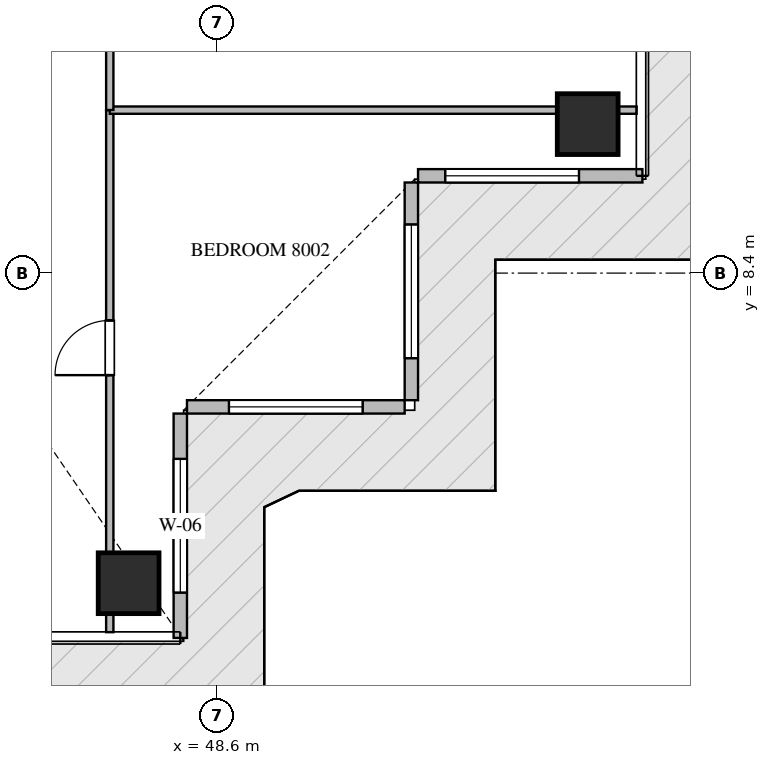
"""IFC4 building model, lengths in metres.
Left out: names, types, materials, properties, quantities, classifications, styles, units other than length and angle.
Written with IfcOpenShell. Run it as: python <this file> out.ifc"""

import sys

from ifc_helpers import new_model, si_unit, direction, frame, frame_2d, origin, origin_2d, place, context, subcontext, project, spatial, rectangle, extrude, source, transform, mapped, element, fill, save


model = new_model("IFC4")
c1 = context("Model", 3, precision=1e-05, world=origin(), true_north=direction((0.0, 1.0)))
c2 = subcontext(c1, "Body", "Model", "MODEL_VIEW")
j1 = project(units=[si_unit("LENGTHUNIT", "METRE"), si_unit("PLANEANGLEUNIT", "RADIAN")], contexts=[c1])
p1 = place(None, origin())
s1 = spatial("IfcSite", under=j1, at=p1, CompositionType="ELEMENT")
p2 = place(p1, origin())
s2 = spatial("IfcBuilding", under=s1, at=p2, CompositionType="ELEMENT")
p3 = place(p2, frame((0.0, 0.0, 321.8)))
s3 = spatial("IfcBuildingStorey", under=s2, at=p3, CompositionType="ELEMENT", Elevation=321.8)
m1 = source(origin(), c2, "Body", "SweptSolid", [
    extrude(rectangle(XDim=1.0, YDim=1.0, at=origin_2d()), origin(), (0.0, 0.0, 1.0), 4.05),
])
for number, where, z_axis, x_axis in (
    (1, (47.15, 3.3, -0.26), (0.0, 0.0, 1.0), (1.0, 0.0, 0.0)),
    (2, (54.7, 10.85, -0.26), (0.0, 0.0, 1.0), (1.0, 0.0, 0.0)),
):
    element("IfcColumn", number, at=place(p3, frame(where, z_axis=z_axis, x_axis=x_axis)), inside=s3, PredefinedType="COLUMN", context=c2, shape_type="MappedRepresentation", body=[
        mapped(m1, transform((0.0, 0.0, 0.0), scale=1.0)),
    ])
p4 = place(p3, frame((48.0, 2.4, 0.0), z_axis=(0.0, 0.0, 1.0), x_axis=(0.0, 1.0, 0.0)))
e3 = element("IfcWall", 3, at=p4, inside=s3, PredefinedType="ELEMENTEDWALL", context=c2, shape_type="SweptSolid", body=[
    extrude(rectangle(XDim=3.69, YDim=0.22, at=frame_2d((1.845, 0.0))), origin(), (0.0, 0.0, 1.0), 3.775),
])
p5 = place(p4, frame((0.745, 0.0, 0.65)))
e4 = element("IfcOpeningElement", 4, at=p5, cuts=e3, PredefinedType="OPENING", context=c2, shape_type="SweptSolid", body=[
    extrude(rectangle(XDim=2.2, YDim=2.4, at=frame_2d((1.1, 1.2))), frame((0.0, 0.12, 0.0), z_axis=(0.0, -1.0, 0.0), x_axis=(1.0, 0.0, 0.0)), (0.0, 0.0, 1.0), 0.24),
])
p6 = place(p3, frame((48.11, 6.2, 0.0), z_axis=(0.0, 0.0, 1.0), x_axis=(1.0, 0.0, 0.0)))
e5 = element("IfcWall", 5, at=p6, inside=s3, PredefinedType="ELEMENTEDWALL", context=c2, shape_type="SweptSolid", body=[
    extrude(rectangle(XDim=3.58, YDim=0.22, at=frame_2d((1.79, 0.0))), origin(), (0.0, 0.0, 1.0), 3.775),
])
p7 = place(p6, frame((0.69, 0.0, 0.65)))
e6 = element("IfcOpeningElement", 6, at=p7, cuts=e5, PredefinedType="OPENING", context=c2, shape_type="SweptSolid", body=[
    extrude(rectangle(XDim=2.2, YDim=2.4, at=frame_2d((1.1, 1.2))), frame((0.0, 0.12, 0.0), z_axis=(0.0, -1.0, 0.0), x_axis=(1.0, 0.0, 0.0)), (0.0, 0.0, 1.0), 0.24),
])
p8 = place(p3, frame((51.8, 6.31, 0.0), z_axis=(0.0, 0.0, 1.0), x_axis=(0.0, 1.0, 0.0)))
e7 = element("IfcWall", 7, at=p8, inside=s3, PredefinedType="ELEMENTEDWALL", context=c2, shape_type="SweptSolid", body=[
    extrude(rectangle(XDim=3.58, YDim=0.22, at=frame_2d((1.79, 0.0))), origin(), (0.0, 0.0, 1.0), 3.775),
])
p9 = place(p8, frame((0.69, 0.0, 0.65)))
e8 = element("IfcOpeningElement", 8, at=p9, cuts=e7, PredefinedType="OPENING", context=c2, shape_type="SweptSolid", body=[
    extrude(rectangle(XDim=2.2, YDim=2.4, at=frame_2d((1.1, 1.2))), frame((0.0, 0.12, 0.0), z_axis=(0.0, -1.0, 0.0), x_axis=(1.0, 0.0, 0.0)), (0.0, 0.0, 1.0), 0.24),
])
p10 = place(p3, frame((51.91, 10.0, 0.0), z_axis=(0.0, 0.0, 1.0), x_axis=(1.0, 0.0, 0.0)))
e9 = element("IfcWall", 9, at=p10, inside=s3, PredefinedType="ELEMENTEDWALL", context=c2, shape_type="SweptSolid", body=[
    extrude(rectangle(XDim=3.69, YDim=0.22, at=frame_2d((1.845, 0.0))), origin(), (0.0, 0.0, 1.0), 3.775),
])
p11 = place(p10, frame((0.447, 0.0, 0.65)))
e10 = element("IfcOpeningElement", 10, at=p11, cuts=e9, PredefinedType="OPENING", context=c2, shape_type="SweptSolid", body=[
    extrude(rectangle(XDim=2.2, YDim=2.4, at=frame_2d((1.1, 1.2))), frame((0.0, 0.12, 0.0), z_axis=(0.0, -1.0, 0.0), x_axis=(1.0, 0.0, 0.0)), (0.0, 0.0, 1.0), 0.24),
])
p12 = place(p3, frame((46.84, 2.495, 0.0), z_axis=(0.0, 0.0, 1.0), x_axis=(0.0, 1.0, 0.0)))
e11 = element("IfcWall", 11, at=p12, inside=s3, PredefinedType="PARTITIONING", context=c2, shape_type="SweptSolid", body=[
    extrude(rectangle(XDim=8.585, YDim=0.12, at=frame_2d((4.292, 0.0))), origin(), (0.0, 0.0, 1.0), 3.79),
])
p13 = place(p12, frame((4.227, 0.0, 0.0)))
e12 = element("IfcOpeningElement", 12, at=p13, cuts=e11, PredefinedType="OPENING", context=c2, shape_type="SweptSolid", body=[
    extrude(rectangle(XDim=0.9, YDim=2.1, at=frame_2d((0.45, 1.05))), frame((0.0, 0.07, 0.0), z_axis=(0.0, -1.0, 0.0), x_axis=(1.0, 0.0, 0.0)), (0.0, 0.0, 1.0), 0.14),
])
p14 = place(p3, frame((46.84, 11.08, 0.0), z_axis=(0.0, 0.0, 1.0), x_axis=(1.0, 0.0, 0.0)))
e13 = element("IfcWall", 13, at=p14, inside=s3, PredefinedType="PARTITIONING", context=c2, shape_type="SweptSolid", body=[
    extrude(rectangle(XDim=8.665, YDim=0.12, at=frame_2d((4.333, 0.0))), origin(), (0.0, 0.0, 1.0), 3.372),
])
p15 = place(p3, frame((46.84, 11.082, 0.0), z_axis=(0.0, 0.0, 1.0), x_axis=(0.0, 1.0, 0.0)))
e14 = element("IfcWall", 14, at=p15, inside=s3, PredefinedType="PARTITIONING", context=c2, shape_type="SweptSolid", body=[
    extrude(rectangle(XDim=3.668, YDim=0.12, at=frame_2d((1.834, 0.0))), origin(), (0.0, 0.0, 1.0), 3.79),
])
p16 = place(p15, frame((1.409, 0.0, 0.0)))
e15 = element("IfcOpeningElement", 15, at=p16, cuts=e14, PredefinedType="OPENING", context=c2, shape_type="SweptSolid", body=[
    extrude(rectangle(XDim=0.85, YDim=2.1, at=frame_2d((0.425, 1.05))), frame((0.0, 0.07, 0.0), z_axis=(0.0, -1.0, 0.0), x_axis=(1.0, 0.0, 0.0)), (0.0, 0.0, 1.0), 0.14),
])
m2 = source(origin(), c2, "Body", "SweptSolid", [
    extrude(rectangle(XDim=2.2, YDim=2.4, at=frame_2d((1.1, 1.2))), frame((0.0, 0.03, 0.0), z_axis=(0.0, -1.0, 0.0), x_axis=(1.0, 0.0, 0.0)), (0.0, 0.0, 1.0), 0.06),
])
p17 = place(p5, origin())
e16 = element("IfcWindow", 16, at=p17, inside=s3, PartitioningType="SINGLE_PANEL", PredefinedType="WINDOW", context=c2, shape_type="MappedRepresentation", body=[
    mapped(m2, transform((0.0, 0.0, 0.0), scale=1.0)),
])
fill(e4, e16)
p18 = place(p7, origin())
e17 = element("IfcWindow", 17, at=p18, inside=s3, PartitioningType="SINGLE_PANEL", PredefinedType="WINDOW", context=c2, shape_type="MappedRepresentation", body=[
    mapped(m2, transform((0.0, 0.0, 0.0), scale=1.0)),
])
fill(e6, e17)
p19 = place(p9, origin())
e18 = element("IfcWindow", 18, at=p19, inside=s3, PartitioningType="SINGLE_PANEL", PredefinedType="WINDOW", context=c2, shape_type="MappedRepresentation", body=[
    mapped(m2, transform((0.0, 0.0, 0.0), scale=1.0)),
])
fill(e8, e18)
p20 = place(p11, origin())
e19 = element("IfcWindow", 19, at=p20, inside=s3, PartitioningType="SINGLE_PANEL", PredefinedType="WINDOW", context=c2, shape_type="MappedRepresentation", body=[
    mapped(m2, transform((0.0, 0.0, 0.0), scale=1.0)),
])
fill(e10, e19)
m3 = source(origin(), c2, "Body", "SweptSolid", [
    extrude(rectangle(XDim=0.9, YDim=2.1, at=frame_2d((0.45, 1.05))), frame((0.0, 0.025, 0.0), z_axis=(0.0, -1.0, 0.0), x_axis=(1.0, 0.0, 0.0)), (0.0, 0.0, 1.0), 0.05),
])
p21 = place(p13, origin())
e20 = element("IfcDoor", 20, at=p21, inside=s3, OperationType="SINGLE_SWING_LEFT", PredefinedType="DOOR", context=c2, shape_type="MappedRepresentation", body=[
    mapped(m3, transform((0.0, 0.0, 0.0), scale=1.0)),
])
fill(e12, e20)
save(model, sys.argv[1])
